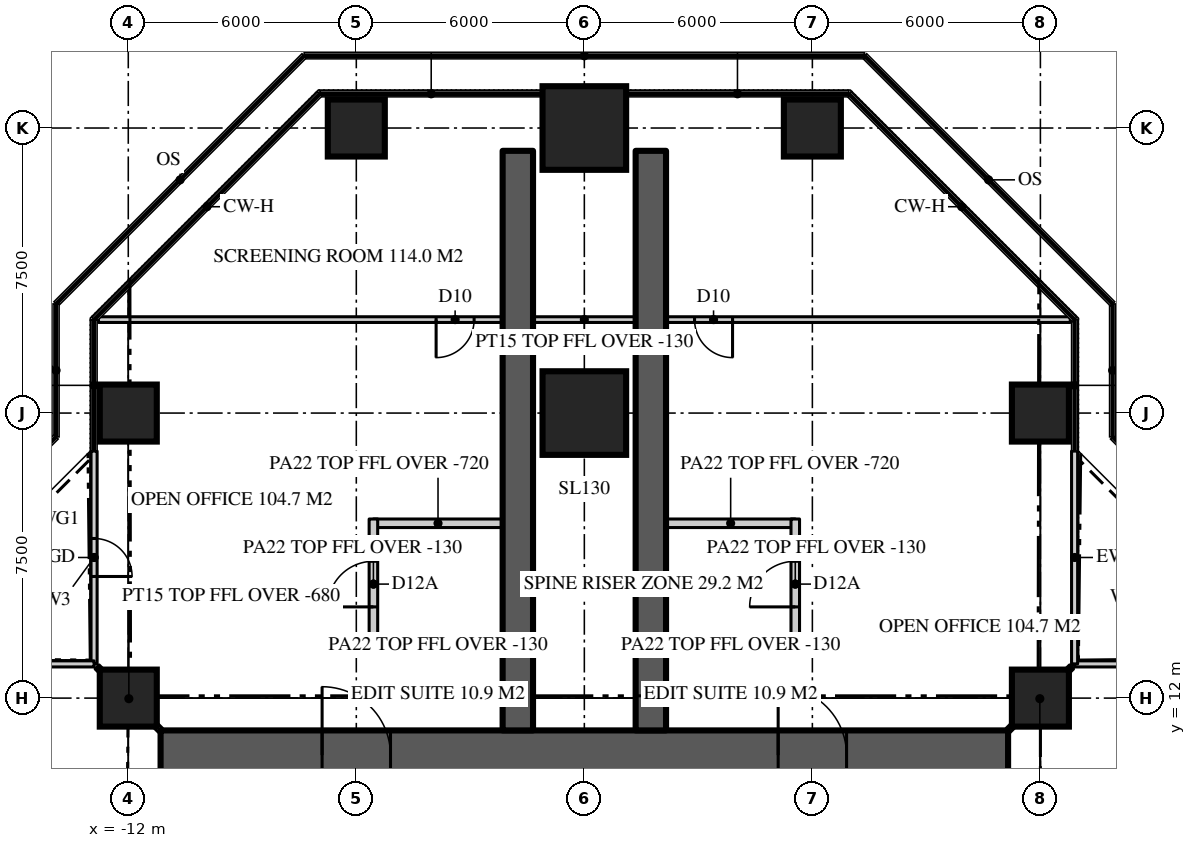
"""IFC4 building model, lengths in metres.
Left out: names, types, materials, properties, quantities, classifications, styles, units other than length and angle.
Written with IfcOpenShell. Run it as: python <this file> out.ifc"""

import sys

from ifc_helpers import new_model, si_unit, direction, frame, frame_2d, origin, origin_2d, place, context, subcontext, project, spatial, rectangle, extrude, element, fill, save


model = new_model("IFC4")
c1 = context("Model", 3, precision=1e-05, world=origin(), true_north=direction((0.0, 1.0)))
c2 = subcontext(c1, "Body", "Model", "MODEL_VIEW")
j1 = project(units=[si_unit("LENGTHUNIT", "METRE"), si_unit("PLANEANGLEUNIT", "RADIAN")], contexts=[c1])
p1 = place(None, origin())
s1 = spatial("IfcSite", under=j1, at=p1, CompositionType="ELEMENT")
p2 = place(p1, origin())
s2 = spatial("IfcBuilding", under=s1, at=p2, CompositionType="ELEMENT")
p3 = place(p2, frame((0.0, 0.0, 228.3)))
s3 = spatial("IfcBuildingStorey", under=s2, at=p3, CompositionType="ELEMENT", Elevation=228.3)
p4 = place(p3, frame((-11.15, 10.5, 0.0), z_axis=(0.0, 0.0, 1.0), x_axis=(1.0, 0.0, 0.0)))
e1 = element("IfcWall", 1, at=p4, inside=s3, PredefinedType="SHEAR", context=c2, shape_type="SweptSolid", body=[
    extrude(rectangle(XDim=22.3, YDim=1.3, at=frame_2d((11.15, 0.0))), origin(), (0.0, 0.0, 1.0), 3.9),
])
p5 = place(p4, frame((4.25, 0.0, 0.0)))
e2 = element("IfcOpeningElement", 2, at=p5, cuts=e1, PredefinedType="OPENING", context=c2, shape_type="SweptSolid", body=[
    extrude(rectangle(XDim=1.8, YDim=2.2, at=frame_2d((0.9, 1.1))), frame((0.0, 0.66, 0.0), z_axis=(0.0, -1.0, 0.0), x_axis=(1.0, 0.0, 0.0)), (0.0, 0.0, 1.0), 1.32),
])
p6 = place(p4, frame((16.25, 0.0, 0.0)))
e3 = element("IfcOpeningElement", 3, at=p6, cuts=e1, PredefinedType="OPENING", context=c2, shape_type="SweptSolid", body=[
    extrude(rectangle(XDim=1.8, YDim=2.2, at=frame_2d((0.9, 1.1))), frame((0.0, 0.66, 0.0), z_axis=(0.0, -1.0, 0.0), x_axis=(1.0, 0.0, 0.0)), (0.0, 0.0, 1.0), 1.32),
])
for number, where, z_axis, x_axis in (
    (4, (1.75, 11.15, 0.0), (0.0, 0.0, 1.0), (0.0, 1.0, 0.0)),
    (5, (-1.75, 11.15, 0.0), (0.0, 0.0, 1.0), (0.0, 1.0, 0.0)),
):
    element("IfcWall", number, at=place(p3, frame(where, z_axis=z_axis, x_axis=x_axis)), inside=s3, PredefinedType="SHEAR", context=c2, shape_type="SweptSolid", body=[
        extrude(rectangle(XDim=15.25, YDim=0.8, at=frame_2d((7.625, 0.0))), origin(), (0.0, 0.0, 1.0), 3.9),
    ])
for number, where, z_axis, x_axis in (
    (6, (-12.0, 12.0, 0.0), (0.0, 0.0, 1.0), (1.0, 0.0, 0.0)),
    (7, (12.0, 12.0, 0.0), (0.0, 0.0, 1.0), (1.0, 0.0, 0.0)),
    (8, (-12.0, 19.5, 0.0), (0.0, 0.0, 1.0), (1.0, 0.0, 0.0)),
):
    element("IfcColumn", number, at=place(p3, frame(where, z_axis=z_axis, x_axis=x_axis)), inside=s3, PredefinedType="COLUMN", context=c2, shape_type="SweptSolid", body=[
        extrude(rectangle(XDim=1.5, YDim=1.5, at=origin_2d()), origin(), (0.0, 0.0, 1.0), 3.9),
    ])
p7 = place(p3, frame((0.0, 19.5, 0.0), z_axis=(0.0, 0.0, 1.0), x_axis=(1.0, 0.0, 0.0)))
e9 = element("IfcColumn", 9, at=p7, inside=s3, PredefinedType="COLUMN", context=c2, shape_type="SweptSolid", body=[
    extrude(rectangle(XDim=2.2, YDim=2.2, at=origin_2d()), origin(), (0.0, 0.0, 1.0), 3.9),
])
for number, where, z_axis, x_axis in (
    (10, (12.0, 19.5, 0.0), (0.0, 0.0, 1.0), (1.0, 0.0, 0.0)),
    (11, (-6.0, 27.0, 0.0), (0.0, 0.0, 1.0), (1.0, 0.0, 0.0)),
):
    element("IfcColumn", number, at=place(p3, frame(where, z_axis=z_axis, x_axis=x_axis)), inside=s3, PredefinedType="COLUMN", context=c2, shape_type="SweptSolid", body=[
        extrude(rectangle(XDim=1.5, YDim=1.5, at=origin_2d()), origin(), (0.0, 0.0, 1.0), 3.9),
    ])
p8 = place(p3, frame((0.0, 27.0, 0.0), z_axis=(0.0, 0.0, 1.0), x_axis=(1.0, 0.0, 0.0)))
e12 = element("IfcColumn", 12, at=p8, inside=s3, PredefinedType="COLUMN", context=c2, shape_type="SweptSolid", body=[
    extrude(rectangle(XDim=2.2, YDim=2.2, at=origin_2d()), origin(), (0.0, 0.0, 1.0), 3.9),
])
p9 = place(p3, frame((6.0, 27.0, 0.0), z_axis=(0.0, 0.0, 1.0), x_axis=(1.0, 0.0, 0.0)))
e13 = element("IfcColumn", 13, at=p9, inside=s3, PredefinedType="COLUMN", context=c2, shape_type="SweptSolid", body=[
    extrude(rectangle(XDim=1.5, YDim=1.5, at=origin_2d()), origin(), (0.0, 0.0, 1.0), 3.9),
])
p10 = place(p3, frame((18.5, 12.9, 0.0), z_axis=(0.0, 0.0, 1.0), x_axis=(-1.0, 0.0, 0.0)))
e14 = element("IfcWall", 14, at=p10, inside=s3, PredefinedType="SOLIDWALL", context=c2, shape_type="SweptSolid", body=[
    extrude(rectangle(XDim=5.6, YDim=0.16, at=frame_2d((2.8, 0.0))), origin(), (0.0, 0.0, 1.0), 3.77),
])
p11 = place(p10, frame((2.3, 0.0, 0.0)))
e15 = element("IfcOpeningElement", 15, at=p11, cuts=e14, PredefinedType="OPENING", context=c2, shape_type="SweptSolid", body=[
    extrude(rectangle(XDim=1.0, YDim=2.2, at=frame_2d((0.5, 1.1))), frame((0.0, 0.09, 0.0), z_axis=(0.0, -1.0, 0.0), x_axis=(1.0, 0.0, 0.0)), (0.0, 0.0, 1.0), 0.18),
])
p12 = place(p3, frame((12.9, 12.9, 0.0), z_axis=(0.0, 0.0, 1.0), x_axis=(0.0, 1.0, 0.0)))
e16 = element("IfcWall", 16, at=p12, inside=s3, PredefinedType="SOLIDWALL", context=c2, shape_type="SweptSolid", body=[
    extrude(rectangle(XDim=5.6, YDim=0.16, at=frame_2d((2.8, 0.0))), origin(), (0.0, 0.0, 1.0), 3.77),
])
p13 = place(p3, frame((-12.9, 18.5, 0.0), z_axis=(0.0, 0.0, 1.0), x_axis=(0.0, -1.0, 0.0)))
e17 = element("IfcWall", 17, at=p13, inside=s3, PredefinedType="SOLIDWALL", context=c2, shape_type="SweptSolid", body=[
    extrude(rectangle(XDim=5.6, YDim=0.16, at=frame_2d((2.8, 0.0))), origin(), (0.0, 0.0, 1.0), 3.77),
])
p14 = place(p13, frame((2.3, 0.0, 0.0)))
e18 = element("IfcOpeningElement", 18, at=p14, cuts=e17, PredefinedType="OPENING", context=c2, shape_type="SweptSolid", body=[
    extrude(rectangle(XDim=1.0, YDim=2.2, at=frame_2d((0.5, 1.1))), frame((0.0, 0.09, 0.0), z_axis=(0.0, -1.0, 0.0), x_axis=(1.0, 0.0, 0.0)), (0.0, 0.0, 1.0), 0.18),
])
p15 = place(p3, frame((-12.9, 12.9, 0.0), z_axis=(0.0, 0.0, 1.0), x_axis=(-1.0, 0.0, 0.0)))
e19 = element("IfcWall", 19, at=p15, inside=s3, PredefinedType="SOLIDWALL", context=c2, shape_type="SweptSolid", body=[
    extrude(rectangle(XDim=5.6, YDim=0.16, at=frame_2d((2.8, 0.0))), origin(), (0.0, 0.0, 1.0), 3.77),
])
p16 = place(p3, frame((12.786, 21.959, 0.0), z_axis=(0.0, 0.0, 1.0), x_axis=(-1.0, 0.0, 0.0)))
e20 = element("IfcWall", 20, at=p16, inside=s3, PredefinedType="PARTITIONING", context=c2, shape_type="SweptSolid", body=[
    extrude(rectangle(XDim=25.573, YDim=0.15, at=frame_2d((12.786, 0.0))), origin(), (0.0, 0.0, 1.0), 3.77),
])
p17 = place(p16, frame((15.687, 0.0, 0.0)))
e21 = element("IfcOpeningElement", 21, at=p17, cuts=e20, PredefinedType="OPENING", context=c2, shape_type="SweptSolid", body=[
    extrude(rectangle(XDim=1.0, YDim=2.2, at=frame_2d((0.5, 1.1))), frame((0.0, 0.085, 0.0), z_axis=(0.0, -1.0, 0.0), x_axis=(1.0, 0.0, 0.0)), (0.0, 0.0, 1.0), 0.17),
])
p18 = place(p16, frame((8.886, 0.0, 0.0)))
e22 = element("IfcOpeningElement", 22, at=p18, cuts=e20, PredefinedType="OPENING", context=c2, shape_type="SweptSolid", body=[
    extrude(rectangle(XDim=1.0, YDim=2.2, at=frame_2d((0.5, 1.1))), frame((0.0, 0.085, 0.0), z_axis=(0.0, -1.0, 0.0), x_axis=(1.0, 0.0, 0.0)), (0.0, 0.0, 1.0), 0.17),
])
p19 = place(p3, frame((-2.15, 13.4, 0.0), z_axis=(0.0, 0.0, 1.0), x_axis=(-1.0, 0.0, 0.0)))
e23 = element("IfcWall", 23, at=p19, inside=s3, PredefinedType="PARTITIONING", context=c2, shape_type="SweptSolid", body=[
    extrude(rectangle(XDim=3.4, YDim=0.225, at=frame_2d((1.7, 0.0))), origin(), (0.0, 0.0, 1.0), 3.77),
])
p20 = place(p3, frame((-2.15, 16.6, 0.0), z_axis=(0.0, 0.0, 1.0), x_axis=(-1.0, 0.0, 0.0)))
e24 = element("IfcWall", 24, at=p20, inside=s3, PredefinedType="PARTITIONING", context=c2, shape_type="SweptSolid", body=[
    extrude(rectangle(XDim=3.4, YDim=0.225, at=frame_2d((1.7, 0.0))), origin(), (0.0, 0.0, 1.0), 3.18),
])
p21 = place(p3, frame((-5.55, 13.288, 0.0), z_axis=(0.0, 0.0, 1.0), x_axis=(0.0, 1.0, 0.0)))
e25 = element("IfcWall", 25, at=p21, inside=s3, PredefinedType="PARTITIONING", context=c2, shape_type="SweptSolid", body=[
    extrude(rectangle(XDim=3.425, YDim=0.225, at=frame_2d((1.712, 0.0))), origin(), (0.0, 0.0, 1.0), 3.77),
])
p22 = place(p21, frame((1.113, 0.0, 0.0)))
e26 = element("IfcOpeningElement", 26, at=p22, cuts=e25, PredefinedType="OPENING", context=c2, shape_type="SweptSolid", body=[
    extrude(rectangle(XDim=1.2, YDim=2.2, at=frame_2d((0.6, 1.1))), frame((0.0, 0.123, 0.0), z_axis=(0.0, -1.0, 0.0), x_axis=(1.0, 0.0, 0.0)), (0.0, 0.0, 1.0), 0.245),
])
p23 = place(p3, frame((2.15, 13.4, 0.0), z_axis=(0.0, 0.0, 1.0), x_axis=(1.0, 0.0, 0.0)))
e27 = element("IfcWall", 27, at=p23, inside=s3, PredefinedType="PARTITIONING", context=c2, shape_type="SweptSolid", body=[
    extrude(rectangle(XDim=3.4, YDim=0.225, at=frame_2d((1.7, 0.0))), origin(), (0.0, 0.0, 1.0), 3.77),
])
p24 = place(p3, frame((2.15, 16.6, 0.0), z_axis=(0.0, 0.0, 1.0), x_axis=(1.0, 0.0, 0.0)))
e28 = element("IfcWall", 28, at=p24, inside=s3, PredefinedType="PARTITIONING", context=c2, shape_type="SweptSolid", body=[
    extrude(rectangle(XDim=3.4, YDim=0.225, at=frame_2d((1.7, 0.0))), origin(), (0.0, 0.0, 1.0), 3.18),
])
p25 = place(p3, frame((5.55, 13.288, 0.0), z_axis=(0.0, 0.0, 1.0), x_axis=(0.0, 1.0, 0.0)))
e29 = element("IfcWall", 29, at=p25, inside=s3, PredefinedType="PARTITIONING", context=c2, shape_type="SweptSolid", body=[
    extrude(rectangle(XDim=3.425, YDim=0.225, at=frame_2d((1.712, 0.0))), origin(), (0.0, 0.0, 1.0), 3.77),
])
p26 = place(p25, frame((1.113, 0.0, 0.0)))
e30 = element("IfcOpeningElement", 30, at=p26, cuts=e29, PredefinedType="OPENING", context=c2, shape_type="SweptSolid", body=[
    extrude(rectangle(XDim=1.2, YDim=2.2, at=frame_2d((0.6, 1.1))), frame((0.0, 0.123, 0.0), z_axis=(0.0, -1.0, 0.0), x_axis=(1.0, 0.0, 0.0)), (0.0, 0.0, 1.0), 0.245),
])
for number, where, z_axis, x_axis in (
    (31, (11.15, 11.15, 0.0), (0.0, 0.0, 1.0), (0.707, 0.707, 0.0)),
    (32, (-11.15, 11.15, 0.0), (0.0, 0.0, 1.0), (-0.707, 0.707, 0.0)),
):
    element("IfcWall", number, at=place(p3, frame(where, z_axis=z_axis, x_axis=x_axis)), inside=s3, PredefinedType="PARTITIONING", context=c2, shape_type="SweptSolid", body=[
        extrude(rectangle(XDim=2.362, YDim=0.15, at=frame_2d((1.181, 0.0))), origin(), (0.0, 0.0, 1.0), 3.22),
    ])
p27 = place(p14, origin())
e33 = element("IfcDoor", 33, at=p27, inside=s3, OperationType="SINGLE_SWING_RIGHT", PredefinedType="DOOR", context=c2, shape_type="SweptSolid", body=[
    extrude(rectangle(XDim=1.0, YDim=2.2, at=frame_2d((0.5, 1.1))), frame((0.0, 0.025, 0.0), z_axis=(0.0, -1.0, 0.0), x_axis=(1.0, 0.0, 0.0)), (0.0, 0.0, 1.0), 0.05),
])
fill(e18, e33)
p28 = place(p5, origin())
e34 = element("IfcDoor", 34, at=p28, inside=s3, OperationType="DOUBLE_DOOR_DOUBLE_SWING", PredefinedType="DOOR", context=c2, shape_type="SweptSolid", body=[
    extrude(rectangle(XDim=1.8, YDim=2.2, at=frame_2d((0.9, 1.1))), frame((0.0, 0.025, 0.0), z_axis=(0.0, -1.0, 0.0), x_axis=(1.0, 0.0, 0.0)), (0.0, 0.0, 1.0), 0.05),
])
fill(e2, e34)
p29 = place(p6, origin())
e35 = element("IfcDoor", 35, at=p29, inside=s3, OperationType="DOUBLE_DOOR_DOUBLE_SWING", PredefinedType="DOOR", context=c2, shape_type="SweptSolid", body=[
    extrude(rectangle(XDim=1.8, YDim=2.2, at=frame_2d((0.9, 1.1))), frame((0.0, 0.025, 0.0), z_axis=(0.0, -1.0, 0.0), x_axis=(1.0, 0.0, 0.0)), (0.0, 0.0, 1.0), 0.05),
])
fill(e3, e35)
p30 = place(p17, origin())
e36 = element("IfcDoor", 36, at=p30, inside=s3, OperationType="SINGLE_SWING_RIGHT", PredefinedType="DOOR", context=c2, shape_type="SweptSolid", body=[
    extrude(rectangle(XDim=1.0, YDim=2.2, at=frame_2d((0.5, 1.1))), frame((0.0, 0.025, 0.0), z_axis=(0.0, -1.0, 0.0), x_axis=(1.0, 0.0, 0.0)), (0.0, 0.0, 1.0), 0.05),
])
fill(e21, e36)
p31 = place(p18, origin())
e37 = element("IfcDoor", 37, at=p31, inside=s3, OperationType="SINGLE_SWING_LEFT", PredefinedType="DOOR", context=c2, shape_type="SweptSolid", body=[
    extrude(rectangle(XDim=1.0, YDim=2.2, at=frame_2d((0.5, 1.1))), frame((0.0, 0.025, 0.0), z_axis=(0.0, -1.0, 0.0), x_axis=(1.0, 0.0, 0.0)), (0.0, 0.0, 1.0), 0.05),
])
fill(e22, e37)
p32 = place(p22, origin())
e38 = element("IfcDoor", 38, at=p32, inside=s3, OperationType="SINGLE_SWING_LEFT", PredefinedType="DOOR", context=c2, shape_type="SweptSolid", body=[
    extrude(rectangle(XDim=1.2, YDim=2.2, at=frame_2d((0.6, 1.1))), frame((0.0, 0.025, 0.0), z_axis=(0.0, -1.0, 0.0), x_axis=(1.0, 0.0, 0.0)), (0.0, 0.0, 1.0), 0.05),
])
fill(e26, e38)
p33 = place(p26, origin())
e39 = element("IfcDoor", 39, at=p33, inside=s3, OperationType="SINGLE_SWING_LEFT", PredefinedType="DOOR", context=c2, shape_type="SweptSolid", body=[
    extrude(rectangle(XDim=1.2, YDim=2.2, at=frame_2d((0.6, 1.1))), frame((0.0, 0.025, 0.0), z_axis=(0.0, -1.0, 0.0), x_axis=(1.0, 0.0, 0.0)), (0.0, 0.0, 1.0), 0.05),
])
fill(e30, e39)
save(model, sys.argv[1])
